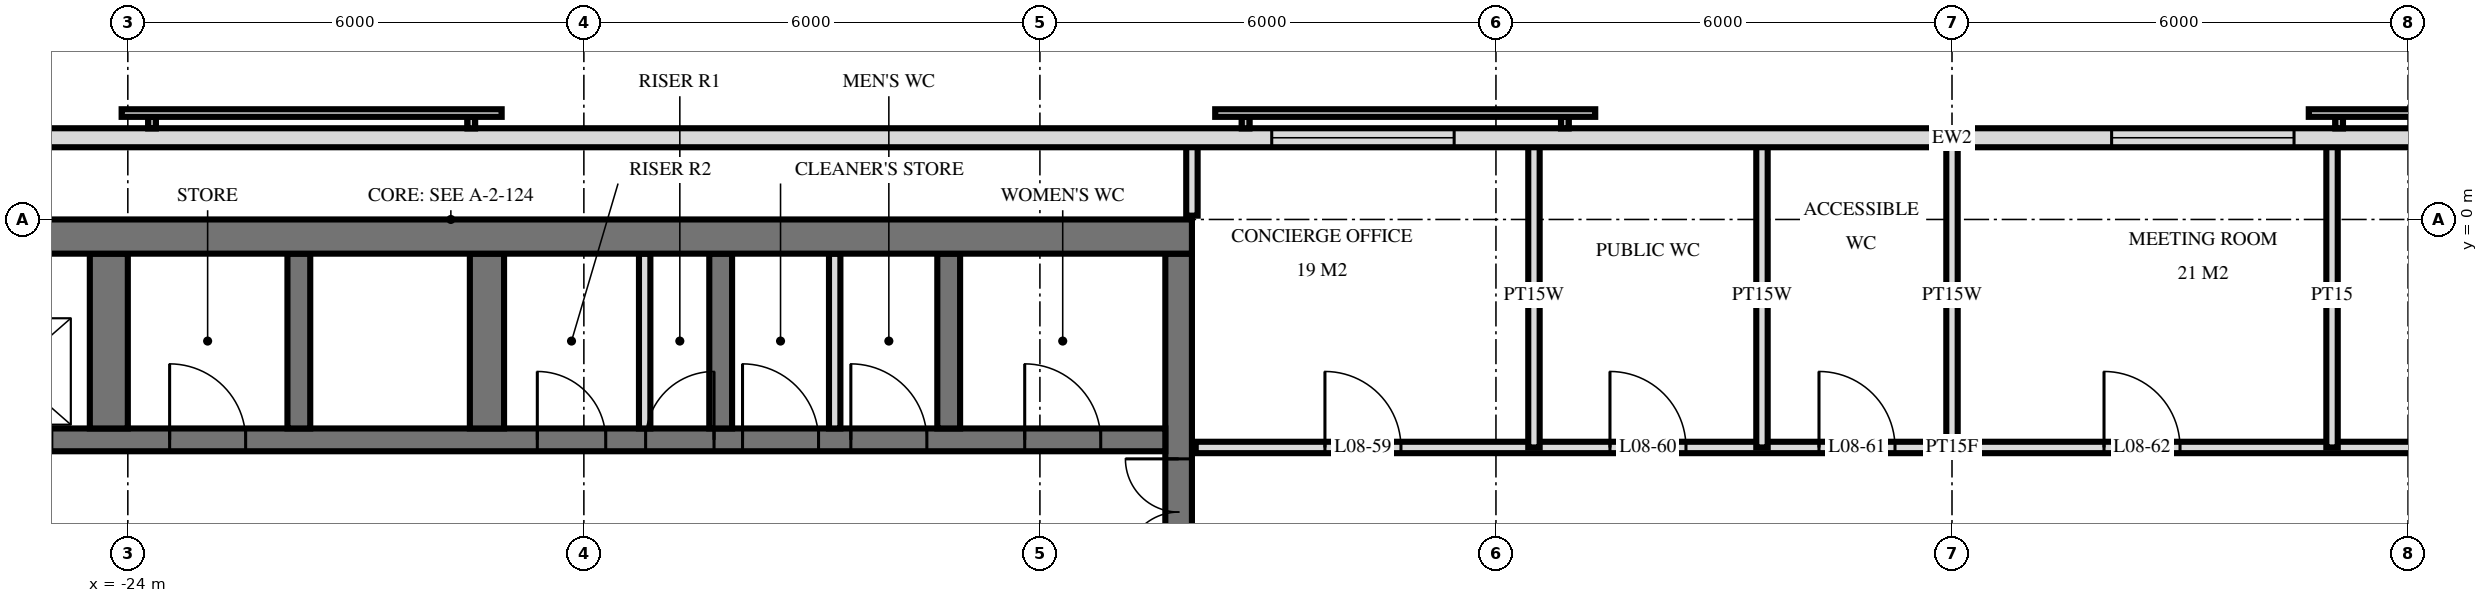
"""IFC4 building model, lengths in metres.
Left out: names, types, materials, properties, quantities, classifications, styles, units other than length and angle.
Written with IfcOpenShell. Run it as: python <this file> out.ifc"""

import sys

from ifc_helpers import new_model, si_unit, direction, frame, frame_2d, origin, place, context, subcontext, project, spatial, rectangle, extrude, element, fill, save


model = new_model("IFC4")
c1 = context("Model", 3, precision=1e-05, world=origin(), true_north=direction((0.0, 1.0)))
c2 = subcontext(c1, "Body", "Model", "MODEL_VIEW")
j1 = project(units=[si_unit("LENGTHUNIT", "METRE"), si_unit("PLANEANGLEUNIT", "RADIAN")], contexts=[c1])
p1 = place(None, origin())
s1 = spatial("IfcSite", under=j1, at=p1, CompositionType="ELEMENT")
p2 = place(p1, origin())
s2 = spatial("IfcBuilding", under=s1, at=p2, CompositionType="ELEMENT")
p3 = place(p2, frame((0.0, 0.0, 38.4)))
s3 = spatial("IfcBuildingStorey", under=s2, at=p3, CompositionType="ELEMENT", Elevation=38.4)
p4 = place(p3, frame((-29.5, -0.225, 0.0), z_axis=(0.0, 0.0, 1.0), x_axis=(1.0, 0.0, 0.0)))
e1 = element("IfcWall", 1, at=p4, inside=s3, PredefinedType="SHEAR", context=c2, shape_type="SweptSolid", body=[
    extrude(rectangle(XDim=19.5, YDim=0.45, at=frame_2d((9.75, 0.0))), origin(), (0.0, 0.0, 1.0), 3.6),
])
p5 = place(p3, frame((-10.175, -14.55, 0.0), z_axis=(0.0, 0.0, 1.0), x_axis=(0.0, 1.0, 0.0)))
e2 = element("IfcWall", 2, at=p5, inside=s3, PredefinedType="SHEAR", context=c2, shape_type="SweptSolid", body=[
    extrude(rectangle(XDim=14.1, YDim=0.35, at=frame_2d((7.05, 0.0))), origin(), (0.0, 0.0, 1.0), 3.6),
])
p6 = place(p5, frame((8.4, 0.0, 0.0)))
e3 = element("IfcOpeningElement", 3, at=p6, cuts=e2, PredefinedType="OPENING", context=c2, shape_type="SweptSolid", body=[
    extrude(rectangle(XDim=1.4, YDim=2.4, at=frame_2d((0.7, 1.2))), frame((0.0, 0.185, 0.0), z_axis=(0.0, -1.0, 0.0), x_axis=(1.0, 0.0, 0.0)), (0.0, 0.0, 1.0), 0.37),
])
p7 = place(p5, frame((10.0, 0.0, 0.0)))
e4 = element("IfcOpeningElement", 4, at=p7, cuts=e2, PredefinedType="OPENING", context=c2, shape_type="SweptSolid", body=[
    extrude(rectangle(XDim=1.4, YDim=2.4, at=frame_2d((0.7, 1.2))), frame((0.0, 0.185, 0.0), z_axis=(0.0, -1.0, 0.0), x_axis=(1.0, 0.0, 0.0)), (0.0, 0.0, 1.0), 0.37),
])
p8 = place(p5, frame((4.0, 0.0, 0.0)))
e5 = element("IfcOpeningElement", 5, at=p8, cuts=e2, PredefinedType="OPENING", context=c2, shape_type="SweptSolid", body=[
    extrude(rectangle(XDim=1.2, YDim=2.1, at=frame_2d((0.6, 1.05))), frame((0.0, 0.185, 0.0), z_axis=(0.0, -1.0, 0.0), x_axis=(1.0, 0.0, 0.0)), (0.0, 0.0, 1.0), 0.37),
])
p9 = place(p3, frame((-29.05, -2.9, 0.0), z_axis=(0.0, 0.0, 1.0), x_axis=(1.0, 0.0, 0.0)))
e6 = element("IfcWall", 6, at=p9, inside=s3, PredefinedType="SHEAR", context=c2, shape_type="SweptSolid", body=[
    extrude(rectangle(XDim=18.7, YDim=0.3, at=frame_2d((9.35, 0.0))), origin(), (0.0, 0.0, 1.0), 3.6),
])
p10 = place(p9, frame((2.95, 0.0, 0.0)))
e7 = element("IfcOpeningElement", 7, at=p10, cuts=e6, PredefinedType="OPENING", context=c2, shape_type="SweptSolid", body=[
    extrude(rectangle(XDim=1.1, YDim=2.1, at=frame_2d((0.55, 1.05))), frame((0.0, 0.16, 0.0), z_axis=(0.0, -1.0, 0.0), x_axis=(1.0, 0.0, 0.0)), (0.0, 0.0, 1.0), 0.32),
])
p11 = place(p9, frame((0.55, 0.0, 0.0)))
e8 = element("IfcOpeningElement", 8, at=p11, cuts=e6, PredefinedType="OPENING", context=c2, shape_type="SweptSolid", body=[
    extrude(rectangle(XDim=1.1, YDim=2.1, at=frame_2d((0.55, 1.05))), frame((0.0, 0.16, 0.0), z_axis=(0.0, -1.0, 0.0), x_axis=(1.0, 0.0, 0.0)), (0.0, 0.0, 1.0), 0.32),
])
p12 = place(p9, frame((11.863, 0.0, 0.0)))
e9 = element("IfcOpeningElement", 9, at=p12, cuts=e6, PredefinedType="OPENING", context=c2, shape_type="SweptSolid", body=[
    extrude(rectangle(XDim=0.9, YDim=2.1, at=frame_2d((0.45, 1.05))), frame((0.0, 0.16, 0.0), z_axis=(0.0, -1.0, 0.0), x_axis=(1.0, 0.0, 0.0)), (0.0, 0.0, 1.0), 0.32),
])
p13 = place(p9, frame((10.438, 0.0, 0.0)))
e10 = element("IfcOpeningElement", 10, at=p13, cuts=e6, PredefinedType="OPENING", context=c2, shape_type="SweptSolid", body=[
    extrude(rectangle(XDim=0.9, YDim=2.1, at=frame_2d((0.45, 1.05))), frame((0.0, 0.16, 0.0), z_axis=(0.0, -1.0, 0.0), x_axis=(1.0, 0.0, 0.0)), (0.0, 0.0, 1.0), 0.32),
])
p14 = place(p9, frame((16.85, 0.0, 0.0)))
e11 = element("IfcOpeningElement", 11, at=p14, cuts=e6, PredefinedType="OPENING", context=c2, shape_type="SweptSolid", body=[
    extrude(rectangle(XDim=1.0, YDim=2.1, at=frame_2d((0.5, 1.05))), frame((0.0, 0.16, 0.0), z_axis=(0.0, -1.0, 0.0), x_axis=(1.0, 0.0, 0.0)), (0.0, 0.0, 1.0), 0.32),
])
p15 = place(p9, frame((14.562, 0.0, 0.0)))
e12 = element("IfcOpeningElement", 12, at=p15, cuts=e6, PredefinedType="OPENING", context=c2, shape_type="SweptSolid", body=[
    extrude(rectangle(XDim=1.0, YDim=2.1, at=frame_2d((0.5, 1.05))), frame((0.0, 0.16, 0.0), z_axis=(0.0, -1.0, 0.0), x_axis=(1.0, 0.0, 0.0)), (0.0, 0.0, 1.0), 0.32),
])
p16 = place(p9, frame((13.137, 0.0, 0.0)))
e13 = element("IfcOpeningElement", 13, at=p16, cuts=e6, PredefinedType="OPENING", context=c2, shape_type="SweptSolid", body=[
    extrude(rectangle(XDim=1.0, YDim=2.1, at=frame_2d((0.5, 1.05))), frame((0.0, 0.16, 0.0), z_axis=(0.0, -1.0, 0.0), x_axis=(1.0, 0.0, 0.0)), (0.0, 0.0, 1.0), 0.32),
])
p17 = place(p9, frame((5.6, 0.0, 0.0)))
e14 = element("IfcOpeningElement", 14, at=p17, cuts=e6, PredefinedType="OPENING", context=c2, shape_type="SweptSolid", body=[
    extrude(rectangle(XDim=1.0, YDim=2.1, at=frame_2d((0.5, 1.05))), frame((0.0, 0.16, 0.0), z_axis=(0.0, -1.0, 0.0), x_axis=(1.0, 0.0, 0.0)), (0.0, 0.0, 1.0), 0.32),
])
for number, where, z_axis, x_axis in (
    (15, (-13.2, -2.75, 0.0), (0.0, 0.0, 1.0), (0.0, 1.0, 0.0)),
    (16, (-16.2, -2.75, 0.0), (0.0, 0.0, 1.0), (0.0, 1.0, 0.0)),
):
    element("IfcWall", number, at=place(p3, frame(where, z_axis=z_axis, x_axis=x_axis)), inside=s3, PredefinedType="SHEAR", context=c2, shape_type="SweptSolid", body=[
        extrude(rectangle(XDim=2.3, YDim=0.3, at=frame_2d((1.15, 0.0))), origin(), (0.0, 0.0, 1.0), 3.6),
    ])
p18 = place(p3, frame((-19.275, -2.75, 0.0), z_axis=(0.0, 0.0, 1.0), x_axis=(0.0, 1.0, 0.0)))
e17 = element("IfcWall", 17, at=p18, inside=s3, PredefinedType="SHEAR", context=c2, shape_type="SweptSolid", body=[
    extrude(rectangle(XDim=2.3, YDim=0.45, at=frame_2d((1.15, 0.0))), origin(), (0.0, 0.0, 1.0), 3.6),
])
p19 = place(p3, frame((-21.75, -2.75, 0.0), z_axis=(0.0, 0.0, 1.0), x_axis=(0.0, 1.0, 0.0)))
e18 = element("IfcWall", 18, at=p19, inside=s3, PredefinedType="SHEAR", context=c2, shape_type="SweptSolid", body=[
    extrude(rectangle(XDim=2.3, YDim=0.3, at=frame_2d((1.15, 0.0))), origin(), (0.0, 0.0, 1.0), 3.6),
])
p20 = place(p3, frame((-24.25, -2.75, 0.0), z_axis=(0.0, 0.0, 1.0), x_axis=(0.0, 1.0, 0.0)))
e19 = element("IfcWall", 19, at=p20, inside=s3, PredefinedType="SHEAR", context=c2, shape_type="SweptSolid", body=[
    extrude(rectangle(XDim=2.3, YDim=0.5, at=frame_2d((1.15, 0.0))), origin(), (0.0, 0.0, 1.0), 3.6),
])
p21 = place(p3, frame((28.775, 1.075, 0.0), z_axis=(0.0, 0.0, 1.0), x_axis=(-1.0, 0.0, 0.0)))
e20 = element("IfcWall", 20, at=p21, inside=s3, PredefinedType="SOLIDWALL", context=c2, shape_type="SweptSolid", body=[
    extrude(rectangle(XDim=57.551, YDim=0.25, at=frame_2d((28.775, 0.0))), origin(), (0.0, 0.0, 1.0), 3.32),
])
p22 = place(p21, frame((24.275, 0.0, 0.3)))
e21 = element("IfcOpeningElement", 21, at=p22, cuts=e20, PredefinedType="OPENING", context=c2, shape_type="SweptSolid", body=[
    extrude(rectangle(XDim=2.4, YDim=2.1, at=frame_2d((1.2, 1.05))), frame((0.0, 0.135, 0.0), z_axis=(0.0, -1.0, 0.0), x_axis=(1.0, 0.0, 0.0)), (0.0, 0.0, 1.0), 0.27),
])
p23 = place(p21, frame((35.325, 0.0, 0.3)))
e22 = element("IfcOpeningElement", 22, at=p23, cuts=e20, PredefinedType="OPENING", context=c2, shape_type="SweptSolid", body=[
    extrude(rectangle(XDim=2.4, YDim=2.1, at=frame_2d((1.2, 1.05))), frame((0.0, 0.135, 0.0), z_axis=(0.0, -1.0, 0.0), x_axis=(1.0, 0.0, 0.0)), (0.0, 0.0, 1.0), 0.27),
])
for number, where, z_axis, x_axis in (
    (23, (-17.2, -2.75, 0.0), (0.0, 0.0, 1.0), (0.0, 1.0, 0.0)),
    (24, (-14.7, -2.75, 0.0), (0.0, 0.0, 1.0), (0.0, 1.0, 0.0)),
):
    element("IfcWall", number, at=place(p3, frame(where, z_axis=z_axis, x_axis=x_axis)), inside=s3, PredefinedType="PARTITIONING", context=c2, shape_type="SweptSolid", body=[
        extrude(rectangle(XDim=2.3, YDim=0.15, at=frame_2d((1.15, 0.0))), origin(), (0.0, 0.0, 1.0), 3.3),
    ])
p24 = place(p3, frame((5.0, -3.0, 0.0), z_axis=(0.0, 0.0, 1.0), x_axis=(0.0, 1.0, 0.0)))
e25 = element("IfcWall", 25, at=p24, inside=s3, PredefinedType="PARTITIONING", context=c2, shape_type="SweptSolid", body=[
    extrude(rectangle(XDim=4.02, YDim=0.15, at=frame_2d((2.01, 0.0))), origin(), (0.0, 0.0, 1.0), 3.32),
])
for number, where, z_axis, x_axis in (
    (26, (0.0, -3.0, 0.0), (0.0, 0.0, 1.0), (0.0, 1.0, 0.0)),
    (27, (-2.5, -3.0, 0.0), (0.0, 0.0, 1.0), (0.0, 1.0, 0.0)),
    (28, (-5.5, -3.0, 0.0), (0.0, 0.0, 1.0), (0.0, 1.0, 0.0)),
):
    element("IfcWall", number, at=place(p3, frame(where, z_axis=z_axis, x_axis=x_axis)), inside=s3, PredefinedType="PLUMBINGWALL", context=c2, shape_type="SweptSolid", body=[
        extrude(rectangle(XDim=4.02, YDim=0.15, at=frame_2d((2.01, 0.0))), origin(), (0.0, 0.0, 1.0), 3.32),
    ])
p25 = place(p3, frame((-10.0, 0.05, 0.0), z_axis=(0.0, 0.0, 1.0), x_axis=(0.0, 1.0, 0.0)))
e29 = element("IfcWall", 29, at=p25, inside=s3, PredefinedType="PARTITIONING", context=c2, shape_type="SweptSolid", body=[
    extrude(rectangle(XDim=0.97, YDim=0.15, at=frame_2d((0.485, 0.0))), origin(), (0.0, 0.0, 1.0), 3.32),
])
p26 = place(p3, frame((-9.95, -3.0, 0.0), z_axis=(0.0, 0.0, 1.0), x_axis=(1.0, 0.0, 0.0)))
e30 = element("IfcWall", 30, at=p26, inside=s3, PredefinedType="PARTITIONING", context=c2, shape_type="SweptSolid", body=[
    extrude(rectangle(XDim=19.9, YDim=0.15, at=frame_2d((9.95, 0.0))), origin(), (0.0, 0.0, 1.0), 3.32),
])
p27 = place(p26, frame((1.7, 0.0, 0.0)))
e31 = element("IfcOpeningElement", 31, at=p27, cuts=e30, PredefinedType="OPENING", context=c2, shape_type="SweptSolid", body=[
    extrude(rectangle(XDim=1.0, YDim=2.1, at=frame_2d((0.5, 1.05))), frame((0.0, 0.085, 0.0), z_axis=(0.0, -1.0, 0.0), x_axis=(1.0, 0.0, 0.0)), (0.0, 0.0, 1.0), 0.17),
])
p28 = place(p26, frame((5.45, 0.0, 0.0)))
e32 = element("IfcOpeningElement", 32, at=p28, cuts=e30, PredefinedType="OPENING", context=c2, shape_type="SweptSolid", body=[
    extrude(rectangle(XDim=1.0, YDim=2.1, at=frame_2d((0.5, 1.05))), frame((0.0, 0.085, 0.0), z_axis=(0.0, -1.0, 0.0), x_axis=(1.0, 0.0, 0.0)), (0.0, 0.0, 1.0), 0.17),
])
p29 = place(p26, frame((8.2, 0.0, 0.0)))
e33 = element("IfcOpeningElement", 33, at=p29, cuts=e30, PredefinedType="OPENING", context=c2, shape_type="SweptSolid", body=[
    extrude(rectangle(XDim=1.0, YDim=2.1, at=frame_2d((0.5, 1.05))), frame((0.0, 0.085, 0.0), z_axis=(0.0, -1.0, 0.0), x_axis=(1.0, 0.0, 0.0)), (0.0, 0.0, 1.0), 0.17),
])
p30 = place(p26, frame((11.95, 0.0, 0.0)))
e34 = element("IfcOpeningElement", 34, at=p30, cuts=e30, PredefinedType="OPENING", context=c2, shape_type="SweptSolid", body=[
    extrude(rectangle(XDim=1.0, YDim=2.1, at=frame_2d((0.5, 1.05))), frame((0.0, 0.085, 0.0), z_axis=(0.0, -1.0, 0.0), x_axis=(1.0, 0.0, 0.0)), (0.0, 0.0, 1.0), 0.17),
])
p31 = place(p26, frame((16.95, 0.0, 0.0)))
e35 = element("IfcOpeningElement", 35, at=p31, cuts=e30, PredefinedType="OPENING", context=c2, shape_type="SweptSolid", body=[
    extrude(rectangle(XDim=1.0, YDim=2.1, at=frame_2d((0.5, 1.05))), frame((0.0, 0.085, 0.0), z_axis=(0.0, -1.0, 0.0), x_axis=(1.0, 0.0, 0.0)), (0.0, 0.0, 1.0), 0.17),
])
p32 = place(p22, origin())
e36 = element("IfcWindow", 36, at=p32, inside=s3, PartitioningType="SINGLE_PANEL", PredefinedType="WINDOW", context=c2, shape_type="SweptSolid", body=[
    extrude(rectangle(XDim=2.4, YDim=2.1, at=frame_2d((1.2, 1.05))), frame((0.0, 0.03, 0.0), z_axis=(0.0, -1.0, 0.0), x_axis=(1.0, 0.0, 0.0)), (0.0, 0.0, 1.0), 0.06),
])
fill(e21, e36)
p33 = place(p23, origin())
e37 = element("IfcWindow", 37, at=p33, inside=s3, PartitioningType="SINGLE_PANEL", PredefinedType="WINDOW", context=c2, shape_type="SweptSolid", body=[
    extrude(rectangle(XDim=2.4, YDim=2.1, at=frame_2d((1.2, 1.05))), frame((0.0, 0.03, 0.0), z_axis=(0.0, -1.0, 0.0), x_axis=(1.0, 0.0, 0.0)), (0.0, 0.0, 1.0), 0.06),
])
fill(e22, e37)
p34 = place(p7, origin())
e38 = element("IfcDoor", 38, at=p34, inside=s3, OperationType="DOUBLE_DOOR_SINGLE_SWING", PredefinedType="DOOR", context=c2, shape_type="SweptSolid", body=[
    extrude(rectangle(XDim=1.4, YDim=2.4, at=frame_2d((0.7, 1.2))), frame((0.0, 0.025, 0.0), z_axis=(0.0, -1.0, 0.0), x_axis=(1.0, 0.0, 0.0)), (0.0, 0.0, 1.0), 0.05),
])
fill(e4, e38)
p35 = place(p12, origin())
e39 = element("IfcDoor", 39, at=p35, inside=s3, OperationType="SINGLE_SWING_LEFT", PredefinedType="DOOR", context=c2, shape_type="SweptSolid", body=[
    extrude(rectangle(XDim=0.9, YDim=2.1, at=frame_2d((0.45, 1.05))), frame((0.0, 0.025, 0.0), z_axis=(0.0, -1.0, 0.0), x_axis=(1.0, 0.0, 0.0)), (0.0, 0.0, 1.0), 0.05),
])
fill(e9, e39)
p36 = place(p13, origin())
e40 = element("IfcDoor", 40, at=p36, inside=s3, OperationType="SINGLE_SWING_RIGHT", PredefinedType="DOOR", context=c2, shape_type="SweptSolid", body=[
    extrude(rectangle(XDim=0.9, YDim=2.1, at=frame_2d((0.45, 1.05))), frame((0.0, 0.025, 0.0), z_axis=(0.0, -1.0, 0.0), x_axis=(1.0, 0.0, 0.0)), (0.0, 0.0, 1.0), 0.05),
])
fill(e10, e40)
p37 = place(p14, origin())
e41 = element("IfcDoor", 41, at=p37, inside=s3, OperationType="SINGLE_SWING_RIGHT", PredefinedType="DOOR", context=c2, shape_type="SweptSolid", body=[
    extrude(rectangle(XDim=1.0, YDim=2.1, at=frame_2d((0.5, 1.05))), frame((0.0, 0.025, 0.0), z_axis=(0.0, -1.0, 0.0), x_axis=(1.0, 0.0, 0.0)), (0.0, 0.0, 1.0), 0.05),
])
fill(e11, e41)
p38 = place(p15, origin())
e42 = element("IfcDoor", 42, at=p38, inside=s3, OperationType="SINGLE_SWING_RIGHT", PredefinedType="DOOR", context=c2, shape_type="SweptSolid", body=[
    extrude(rectangle(XDim=1.0, YDim=2.1, at=frame_2d((0.5, 1.05))), frame((0.0, 0.025, 0.0), z_axis=(0.0, -1.0, 0.0), x_axis=(1.0, 0.0, 0.0)), (0.0, 0.0, 1.0), 0.05),
])
fill(e12, e42)
p39 = place(p16, origin())
e43 = element("IfcDoor", 43, at=p39, inside=s3, OperationType="SINGLE_SWING_RIGHT", PredefinedType="DOOR", context=c2, shape_type="SweptSolid", body=[
    extrude(rectangle(XDim=1.0, YDim=2.1, at=frame_2d((0.5, 1.05))), frame((0.0, 0.025, 0.0), z_axis=(0.0, -1.0, 0.0), x_axis=(1.0, 0.0, 0.0)), (0.0, 0.0, 1.0), 0.05),
])
fill(e13, e43)
p40 = place(p17, origin())
e44 = element("IfcDoor", 44, at=p40, inside=s3, OperationType="SINGLE_SWING_RIGHT", PredefinedType="DOOR", context=c2, shape_type="SweptSolid", body=[
    extrude(rectangle(XDim=1.0, YDim=2.1, at=frame_2d((0.5, 1.05))), frame((0.0, 0.025, 0.0), z_axis=(0.0, -1.0, 0.0), x_axis=(1.0, 0.0, 0.0)), (0.0, 0.0, 1.0), 0.05),
])
fill(e14, e44)
p41 = place(p27, origin())
e45 = element("IfcDoor", 45, at=p41, inside=s3, OperationType="SINGLE_SWING_RIGHT", PredefinedType="DOOR", context=c2, shape_type="SweptSolid", body=[
    extrude(rectangle(XDim=1.0, YDim=2.1, at=frame_2d((0.5, 1.05))), frame((0.0, 0.025, 0.0), z_axis=(0.0, -1.0, 0.0), x_axis=(1.0, 0.0, 0.0)), (0.0, 0.0, 1.0), 0.05),
])
fill(e31, e45)
p42 = place(p28, origin())
e46 = element("IfcDoor", 46, at=p42, inside=s3, OperationType="SINGLE_SWING_RIGHT", PredefinedType="DOOR", context=c2, shape_type="SweptSolid", body=[
    extrude(rectangle(XDim=1.0, YDim=2.1, at=frame_2d((0.5, 1.05))), frame((0.0, 0.025, 0.0), z_axis=(0.0, -1.0, 0.0), x_axis=(1.0, 0.0, 0.0)), (0.0, 0.0, 1.0), 0.05),
])
fill(e32, e46)
p43 = place(p29, origin())
e47 = element("IfcDoor", 47, at=p43, inside=s3, OperationType="SINGLE_SWING_RIGHT", PredefinedType="DOOR", context=c2, shape_type="SweptSolid", body=[
    extrude(rectangle(XDim=1.0, YDim=2.1, at=frame_2d((0.5, 1.05))), frame((0.0, 0.025, 0.0), z_axis=(0.0, -1.0, 0.0), x_axis=(1.0, 0.0, 0.0)), (0.0, 0.0, 1.0), 0.05),
])
fill(e33, e47)
p44 = place(p30, origin())
e48 = element("IfcDoor", 48, at=p44, inside=s3, OperationType="SINGLE_SWING_RIGHT", PredefinedType="DOOR", context=c2, shape_type="SweptSolid", body=[
    extrude(rectangle(XDim=1.0, YDim=2.1, at=frame_2d((0.5, 1.05))), frame((0.0, 0.025, 0.0), z_axis=(0.0, -1.0, 0.0), x_axis=(1.0, 0.0, 0.0)), (0.0, 0.0, 1.0), 0.05),
])
fill(e34, e48)
save(model, sys.argv[1])
